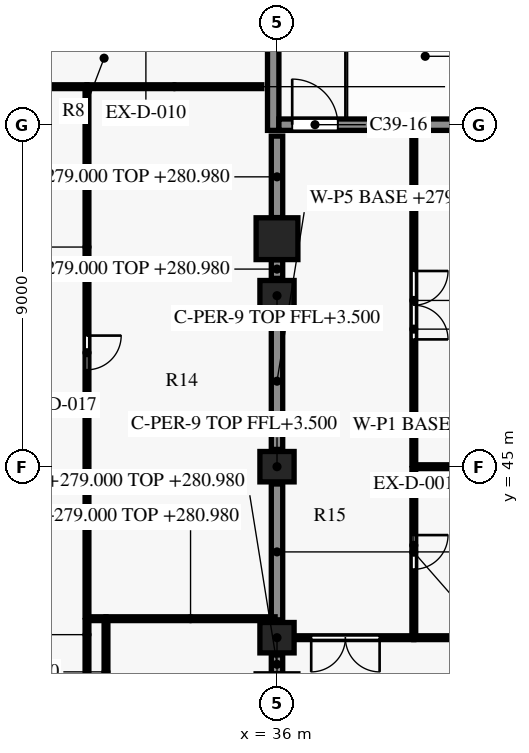
"""IFC4 building model, lengths in metres.
Left out: names, types, materials, properties, quantities, classifications, styles, units other than length and angle.
Written with IfcOpenShell. Run it as: python <this file> out.ifc"""

import sys

from ifc_helpers import new_model, si_unit, direction, frame, frame_2d, origin, origin_2d, place, context, subcontext, project, spatial, rectangle, extrude, element, fill, save


model = new_model("IFC4")
c1 = context("Model", 3, precision=1e-05, world=origin(), true_north=direction((0.0, 1.0)))
c2 = subcontext(c1, "Body", "Model", "MODEL_VIEW")
j1 = project(units=[si_unit("LENGTHUNIT", "METRE"), si_unit("PLANEANGLEUNIT", "RADIAN")], contexts=[c1])
p1 = place(None, origin())
s1 = spatial("IfcSite", under=j1, at=p1, CompositionType="ELEMENT")
p2 = place(p1, origin())
s2 = spatial("IfcBuilding", under=s1, at=p2, CompositionType="ELEMENT")
p3 = place(p2, frame((0.0, 0.0, 279.0)))
s3 = spatial("IfcBuildingStorey", under=s2, at=p3, CompositionType="ELEMENT", Elevation=279.0)
p4 = place(p3, frame((36.0, 51.0, 0.0), z_axis=(0.0, 0.0, 1.0), x_axis=(1.0, 0.0, 0.0)))
e1 = element("IfcColumn", 1, at=p4, inside=s3, PredefinedType="COLUMN", context=c2, shape_type="SweptSolid", body=[
    extrude(rectangle(XDim=1.1, YDim=1.1, at=origin_2d()), origin(), (0.0, 0.0, 1.0), 3.8),
])
p5 = place(p3, frame((36.05, 54.0, 0.0), z_axis=(0.0, 0.0, 1.0), x_axis=(1.0, 0.0, 0.0)))
e2 = element("IfcWall", 2, at=p5, inside=s3, PredefinedType="SHEAR", context=c2, shape_type="SweptSolid", body=[
    extrude(rectangle(XDim=7.7, YDim=0.3, at=frame_2d((3.85, 0.0))), origin(), (0.0, 0.0, 1.0), 3.5),
])
p6 = place(p5, frame((0.35, 0.0, 0.0)))
e3 = element("IfcOpeningElement", 3, at=p6, cuts=e2, PredefinedType="OPENING", context=c2, shape_type="SweptSolid", body=[
    extrude(rectangle(XDim=1.2, YDim=2.2, at=frame_2d((0.6, 1.1))), frame((0.0, 0.16, 0.0), z_axis=(0.0, -1.0, 0.0), x_axis=(1.0, 0.0, 0.0)), (0.0, 0.0, 1.0), 0.32),
])
p7 = place(p3, frame((35.9, 53.85, 0.0), z_axis=(0.0, 0.0, 1.0), x_axis=(0.0, 1.0, 0.0)))
e4 = element("IfcWall", 4, at=p7, inside=s3, PredefinedType="SHEAR", context=c2, shape_type="SweptSolid", body=[
    extrude(rectangle(XDim=4.2, YDim=0.3, at=frame_2d((2.1, 0.0))), origin(), (0.0, 0.0, 1.0), 3.5),
])
p8 = place(p3, frame((36.0, 39.555, 0.0), z_axis=(0.0, 0.0, 1.0), x_axis=(0.0, 1.0, 0.0)))
e5 = element("IfcWall", 5, at=p8, inside=s3, PredefinedType="PARTITIONING", context=c2, shape_type="SweptSolid", body=[
    extrude(rectangle(XDim=0.49, YDim=0.3, at=frame_2d((0.245, 0.0))), origin(), (0.0, 0.0, 1.0), 1.98),
])
p9 = place(p3, frame((39.6, 40.5, 0.0), z_axis=(0.0, 0.0, 1.0), x_axis=(-1.0, 0.0, 0.0)))
e6 = element("IfcWall", 6, at=p9, inside=s3, PredefinedType="PARTITIONING", context=c2, shape_type="SweptSolid", body=[
    extrude(rectangle(XDim=3.195, YDim=0.1, at=frame_2d((1.598, 0.0))), origin(), (0.0, 0.0, 1.0), 3.33),
])
p10 = place(p9, frame((0.9, 0.0, 0.0)))
e7 = element("IfcOpeningElement", 7, at=p10, cuts=e6, PredefinedType="OPENING", context=c2, shape_type="SweptSolid", body=[
    extrude(rectangle(XDim=1.8, YDim=2.1, at=frame_2d((0.9, 1.05))), frame((0.0, 0.06, 0.0), z_axis=(0.0, -1.0, 0.0), x_axis=(1.0, 0.0, 0.0)), (0.0, 0.0, 1.0), 0.12),
])
p11 = place(p3, frame((44.23, 40.5, 0.0), z_axis=(0.0, 0.0, 1.0), x_axis=(-1.0, 0.0, 0.0)))
e8 = element("IfcWall", 8, at=p11, inside=s3, PredefinedType="PARTITIONING", context=c2, shape_type="SweptSolid", body=[
    extrude(rectangle(XDim=4.63, YDim=0.1, at=frame_2d((2.315, 0.0))), origin(), (0.0, 0.0, 1.0), 3.33),
])
p12 = place(p3, frame((31.0, 40.95, 0.0), z_axis=(0.0, 0.0, 1.0), x_axis=(0.0, -1.0, 0.0)))
e9 = element("IfcWall", 9, at=p12, inside=s3, PredefinedType="PARTITIONING", context=c2, shape_type="SweptSolid", body=[
    extrude(rectangle(XDim=7.4, YDim=0.1, at=frame_2d((3.7, 0.0))), origin(), (0.0, 0.0, 1.0), 2.98),
])
p13 = place(p3, frame((31.5, 40.95, 0.0), z_axis=(0.0, 0.0, 1.0), x_axis=(0.0, -1.0, 0.0)))
e10 = element("IfcWall", 10, at=p13, inside=s3, PredefinedType="PARTITIONING", context=c2, shape_type="SweptSolid", body=[
    extrude(rectangle(XDim=8.995, YDim=0.1, at=frame_2d((4.498, 0.0))), origin(), (0.0, 0.0, 1.0), 2.98),
])
p14 = place(p13, frame((3.35, 0.0, 0.0)))
e11 = element("IfcOpeningElement", 11, at=p14, cuts=e10, PredefinedType="OPENING", context=c2, shape_type="SweptSolid", body=[
    extrude(rectangle(XDim=0.9, YDim=2.1, at=frame_2d((0.45, 1.05))), frame((0.0, 0.06, 0.0), z_axis=(0.0, -1.0, 0.0), x_axis=(1.0, 0.0, 0.0)), (0.0, 0.0, 1.0), 0.12),
])
p15 = place(p3, frame((31.05, 41.0, 0.0), z_axis=(0.0, 0.0, 1.0), x_axis=(1.0, 0.0, 0.0)))
e12 = element("IfcWall", 12, at=p15, inside=s3, PredefinedType="PARTITIONING", context=c2, shape_type="SweptSolid", body=[
    extrude(rectangle(XDim=0.45, YDim=0.1, at=frame_2d((0.225, 0.0))), origin(), (0.0, 0.0, 1.0), 3.33),
])
p16 = place(p3, frame((35.95, 41.0, 0.0), z_axis=(0.0, 0.0, 1.0), x_axis=(-1.0, 0.0, 0.0)))
e13 = element("IfcWall", 13, at=p16, inside=s3, PredefinedType="PARTITIONING", context=c2, shape_type="SweptSolid", body=[
    extrude(rectangle(XDim=4.45, YDim=0.1, at=frame_2d((2.225, 0.0))), origin(), (0.0, 0.0, 1.0), 1.98),
])
p17 = place(p3, frame((36.0, 40.97, 0.0), z_axis=(0.0, 0.0, 1.0), x_axis=(0.0, 1.0, 0.0)))
e14 = element("IfcWall", 14, at=p17, inside=s3, PredefinedType="PARTITIONING", context=c2, shape_type="SweptSolid", body=[
    extrude(rectangle(XDim=3.575, YDim=0.3, at=frame_2d((1.788, 0.0))), origin(), (0.0, 0.0, 1.0), 1.98),
])
p18 = place(p3, frame((39.6, 44.95, 0.0), z_axis=(0.0, 0.0, 1.0), x_axis=(0.0, -1.0, 0.0)))
e15 = element("IfcWall", 15, at=p18, inside=s3, PredefinedType="PARTITIONING", context=c2, shape_type="SweptSolid", body=[
    extrude(rectangle(XDim=4.4, YDim=0.1, at=frame_2d((2.2, 0.0))), origin(), (0.0, 0.0, 1.0), 2.98),
])
p19 = place(p18, frame((1.75, 0.0, 0.0)))
e16 = element("IfcOpeningElement", 16, at=p19, cuts=e15, PredefinedType="OPENING", context=c2, shape_type="SweptSolid", body=[
    extrude(rectangle(XDim=0.9, YDim=2.1, at=frame_2d((0.45, 1.05))), frame((0.0, 0.06, 0.0), z_axis=(0.0, -1.0, 0.0), x_axis=(1.0, 0.0, 0.0)), (0.0, 0.0, 1.0), 0.12),
])
p20 = place(p3, frame((39.65, 45.0, 0.0), z_axis=(0.0, 0.0, 1.0), x_axis=(1.0, 0.0, 0.0)))
e17 = element("IfcWall", 17, at=p20, inside=s3, PredefinedType="PARTITIONING", context=c2, shape_type="SweptSolid", body=[
    extrude(rectangle(XDim=4.58, YDim=0.1, at=frame_2d((2.29, 0.0))), origin(), (0.0, 0.0, 1.0), 2.98),
])
p21 = place(p3, frame((36.0, 45.455, 0.0), z_axis=(0.0, 0.0, 1.0), x_axis=(0.0, 1.0, 0.0)))
e18 = element("IfcWall", 18, at=p21, inside=s3, PredefinedType="PARTITIONING", context=c2, shape_type="SweptSolid", body=[
    extrude(rectangle(XDim=3.59, YDim=0.3, at=frame_2d((1.795, 0.0))), origin(), (0.0, 0.0, 1.0), 1.98),
])
p22 = place(p3, frame((36.0, 49.955, 0.0), z_axis=(0.0, 0.0, 1.0), x_axis=(0.0, 1.0, 0.0)))
e19 = element("IfcWall", 19, at=p22, inside=s3, PredefinedType="PARTITIONING", context=c2, shape_type="SweptSolid", body=[
    extrude(rectangle(XDim=0.49, YDim=0.3, at=frame_2d((0.245, 0.0))), origin(), (0.0, 0.0, 1.0), 1.98),
])
p23 = place(p3, frame((36.0, 51.555, 0.0), z_axis=(0.0, 0.0, 1.0), x_axis=(0.0, 1.0, 0.0)))
e20 = element("IfcWall", 20, at=p23, inside=s3, PredefinedType="PARTITIONING", context=c2, shape_type="SweptSolid", body=[
    extrude(rectangle(XDim=2.145, YDim=0.3, at=frame_2d((1.073, 0.0))), origin(), (0.0, 0.0, 1.0), 1.98),
])
p24 = place(p3, frame((39.6, 53.7, 0.0), z_axis=(0.0, 0.0, 1.0), x_axis=(0.0, -1.0, 0.0)))
e21 = element("IfcWall", 21, at=p24, inside=s3, PredefinedType="PARTITIONING", context=c2, shape_type="SweptSolid", body=[
    extrude(rectangle(XDim=8.65, YDim=0.1, at=frame_2d((4.325, 0.0))), origin(), (0.0, 0.0, 1.0), 2.73),
])
p25 = place(p24, frame((3.55, 0.0, 0.0)))
e22 = element("IfcOpeningElement", 22, at=p25, cuts=e21, PredefinedType="OPENING", context=c2, shape_type="SweptSolid", body=[
    extrude(rectangle(XDim=1.8, YDim=2.1, at=frame_2d((0.9, 1.05))), frame((0.0, 0.06, 0.0), z_axis=(0.0, -1.0, 0.0), x_axis=(1.0, 0.0, 0.0)), (0.0, 0.0, 1.0), 0.12),
])
p26 = place(p3, frame((31.0, 54.95, 0.0), z_axis=(0.0, 0.0, 1.0), x_axis=(0.0, -1.0, 0.0)))
e23 = element("IfcWall", 23, at=p26, inside=s3, PredefinedType="PARTITIONING", context=c2, shape_type="SweptSolid", body=[
    extrude(rectangle(XDim=13.9, YDim=0.1, at=frame_2d((6.95, 0.0))), origin(), (0.0, 0.0, 1.0), 2.98),
])
p27 = place(p26, frame((6.5, 0.0, 0.0)))
e24 = element("IfcOpeningElement", 24, at=p27, cuts=e23, PredefinedType="OPENING", context=c2, shape_type="SweptSolid", body=[
    extrude(rectangle(XDim=0.9, YDim=2.1, at=frame_2d((0.45, 1.05))), frame((0.0, 0.06, 0.0), z_axis=(0.0, -1.0, 0.0), x_axis=(1.0, 0.0, 0.0)), (0.0, 0.0, 1.0), 0.12),
])
p28 = place(p3, frame((27.3, 55.0, 0.0), z_axis=(0.0, 0.0, 1.0), x_axis=(1.0, 0.0, 0.0)))
e25 = element("IfcWall", 25, at=p28, inside=s3, PredefinedType="PARTITIONING", context=c2, shape_type="SweptSolid", body=[
    extrude(rectangle(XDim=3.7, YDim=0.1, at=frame_2d((1.85, 0.0))), origin(), (0.0, 0.0, 1.0), 3.33),
])
p29 = place(p28, frame((1.425, 0.0, 0.0)))
e26 = element("IfcOpeningElement", 26, at=p29, cuts=e25, PredefinedType="OPENING", context=c2, shape_type="SweptSolid", body=[
    extrude(rectangle(XDim=0.9, YDim=2.1, at=frame_2d((0.45, 1.05))), frame((0.0, 0.06, 0.0), z_axis=(0.0, -1.0, 0.0), x_axis=(1.0, 0.0, 0.0)), (0.0, 0.0, 1.0), 0.12),
])
p30 = place(p3, frame((35.6, 55.0, 0.0), z_axis=(0.0, 0.0, 1.0), x_axis=(-1.0, 0.0, 0.0)))
e27 = element("IfcWall", 27, at=p30, inside=s3, PredefinedType="PARTITIONING", context=c2, shape_type="SweptSolid", body=[
    extrude(rectangle(XDim=4.6, YDim=0.1, at=frame_2d((2.3, 0.0))), origin(), (0.0, 0.0, 1.0), 2.88),
])
for number, where, z_axis, x_axis in (
    (28, (36.0, 40.5, 0.0), (0.0, 0.0, 1.0), (0.0, 1.0, 0.0)),
    (29, (36.0, 45.0, 0.0), (0.0, 0.0, 1.0), (0.0, 1.0, 0.0)),
    (30, (36.0, 49.5, 0.0), (0.0, 0.0, 1.0), (0.0, 1.0, 0.0)),
):
    element("IfcColumn", number, at=place(p3, frame(where, z_axis=z_axis, x_axis=x_axis)), inside=s3, PredefinedType="COLUMN", context=c2, shape_type="SweptSolid", body=[
        extrude(rectangle(XDim=0.9, YDim=0.8, at=origin_2d()), origin(), (0.0, 0.0, 1.0), 3.5),
    ])
p31 = place(p6, origin())
e31 = element("IfcDoor", 31, at=p31, inside=s3, OperationType="SINGLE_SWING_LEFT", PredefinedType="DOOR", context=c2, shape_type="SweptSolid", body=[
    extrude(rectangle(XDim=1.2, YDim=2.2, at=frame_2d((0.6, 1.1))), frame((0.0, 0.025, 0.0), z_axis=(0.0, -1.0, 0.0), x_axis=(1.0, 0.0, 0.0)), (0.0, 0.0, 1.0), 0.05),
])
fill(e3, e31)
p32 = place(p19, origin())
e32 = element("IfcDoor", 32, at=p32, inside=s3, OperationType="SINGLE_SWING_RIGHT", PredefinedType="DOOR", context=c2, shape_type="SweptSolid", body=[
    extrude(rectangle(XDim=0.9, YDim=2.1, at=frame_2d((0.45, 1.05))), frame((0.0, 0.025, 0.0), z_axis=(0.0, -1.0, 0.0), x_axis=(1.0, 0.0, 0.0)), (0.0, 0.0, 1.0), 0.05),
])
fill(e16, e32)
p33 = place(p25, origin())
e33 = element("IfcDoor", 33, at=p33, inside=s3, OperationType="DOUBLE_DOOR_SINGLE_SWING", PredefinedType="DOOR", context=c2, shape_type="SweptSolid", body=[
    extrude(rectangle(XDim=1.8, YDim=2.1, at=frame_2d((0.9, 1.05))), frame((0.0, 0.025, 0.0), z_axis=(0.0, -1.0, 0.0), x_axis=(1.0, 0.0, 0.0)), (0.0, 0.0, 1.0), 0.05),
])
fill(e22, e33)
p34 = place(p10, origin())
e34 = element("IfcDoor", 34, at=p34, inside=s3, OperationType="DOUBLE_DOOR_SINGLE_SWING", PredefinedType="DOOR", context=c2, shape_type="SweptSolid", body=[
    extrude(rectangle(XDim=1.8, YDim=2.1, at=frame_2d((0.9, 1.05))), frame((0.0, 0.025, 0.0), z_axis=(0.0, -1.0, 0.0), x_axis=(1.0, 0.0, 0.0)), (0.0, 0.0, 1.0), 0.05),
])
fill(e7, e34)
p35 = place(p27, origin())
e35 = element("IfcDoor", 35, at=p35, inside=s3, OperationType="SINGLE_SWING_LEFT", PredefinedType="DOOR", context=c2, shape_type="SweptSolid", body=[
    extrude(rectangle(XDim=0.9, YDim=2.1, at=frame_2d((0.45, 1.05))), frame((0.0, 0.025, 0.0), z_axis=(0.0, -1.0, 0.0), x_axis=(1.0, 0.0, 0.0)), (0.0, 0.0, 1.0), 0.05),
])
fill(e24, e35)
save(model, sys.argv[1])
